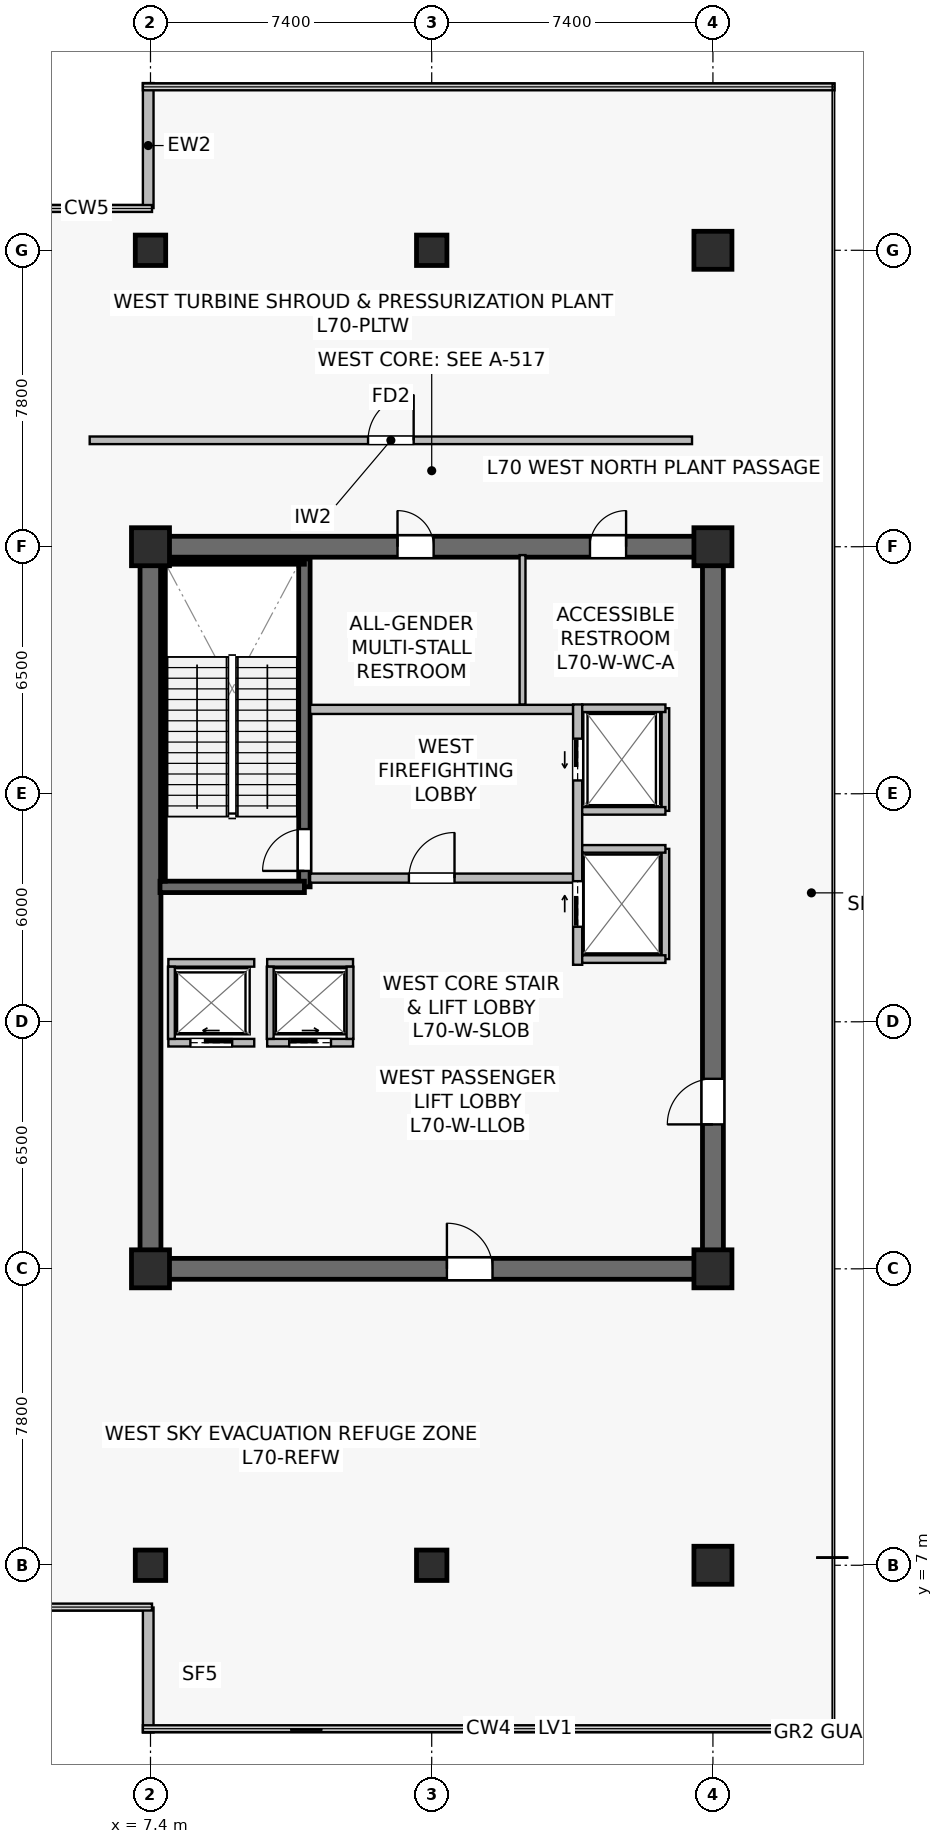
"""IFC4 building model, lengths in metres.
Left out: names, types, materials, properties, quantities, classifications, styles, units other than length and angle.
Written with IfcOpenShell. Run it as: python <this file> out.ifc"""

import sys

from ifc_helpers import new_model, si_unit, direction, frame, frame_2d, origin, origin_2d, place, context, subcontext, project, spatial, rectangle, extrude, source, transform, mapped, element, fill, save


model = new_model("IFC4")
c1 = context("Model", 3, precision=1e-05, world=origin(), true_north=direction((0.0, 1.0)))
c2 = subcontext(c1, "Body", "Model", "MODEL_VIEW")
j1 = project(units=[si_unit("LENGTHUNIT", "METRE"), si_unit("PLANEANGLEUNIT", "RADIAN")], contexts=[c1])
p1 = place(None, origin())
s1 = spatial("IfcSite", under=j1, at=p1, CompositionType="ELEMENT")
p2 = place(p1, origin())
s2 = spatial("IfcBuilding", under=s1, at=p2, CompositionType="ELEMENT")
p3 = place(p2, frame((0.0, 0.0, 291.6)))
s3 = spatial("IfcBuildingStorey", under=s2, at=p3, CompositionType="ELEMENT", Elevation=291.6)
p4 = place(p3, frame((7.125, 14.8, 0.0), z_axis=(0.0, 0.0, 1.0), x_axis=(1.0, 0.0, 0.0)))
e1 = element("IfcWall", 1, at=p4, inside=s3, PredefinedType="SHEAR", context=c2, shape_type="SweptSolid", body=[
    extrude(rectangle(XDim=15.35, YDim=0.55, at=frame_2d((7.675, 0.0))), origin(), (0.0, 0.0, 1.0), 5.7),
])
p5 = place(p4, frame((8.075, 0.0, 0.0)))
e2 = element("IfcOpeningElement", 2, at=p5, cuts=e1, PredefinedType="OPENING", context=c2, shape_type="SweptSolid", body=[
    extrude(rectangle(XDim=1.2, YDim=2.16, at=frame_2d((0.6, 1.08))), frame((0.0, 0.285, 0.0), z_axis=(0.0, -1.0, 0.0), x_axis=(1.0, 0.0, 0.0)), (0.0, 0.0, 1.0), 0.57),
])
p6 = place(p3, frame((7.125, 33.8, 0.0), z_axis=(0.0, 0.0, 1.0), x_axis=(1.0, 0.0, 0.0)))
e3 = element("IfcWall", 3, at=p6, inside=s3, PredefinedType="SHEAR", context=c2, shape_type="SweptSolid", body=[
    extrude(rectangle(XDim=15.35, YDim=0.55, at=frame_2d((7.675, 0.0))), origin(), (0.0, 0.0, 1.0), 5.7),
])
p7 = place(p6, frame((6.775, 0.0, 0.0)))
e4 = element("IfcOpeningElement", 4, at=p7, cuts=e3, PredefinedType="OPENING", context=c2, shape_type="SweptSolid", body=[
    extrude(rectangle(XDim=0.95, YDim=2.15, at=frame_2d((0.475, 1.075))), frame((0.0, 0.285, 0.0), z_axis=(0.0, -1.0, 0.0), x_axis=(1.0, 0.0, 0.0)), (0.0, 0.0, 1.0), 0.57),
])
p8 = place(p6, frame((11.84, 0.0, 0.0)))
e5 = element("IfcOpeningElement", 5, at=p8, cuts=e3, PredefinedType="OPENING", context=c2, shape_type="SweptSolid", body=[
    extrude(rectangle(XDim=0.95, YDim=2.15, at=frame_2d((0.475, 1.075))), frame((0.0, 0.285, 0.0), z_axis=(0.0, -1.0, 0.0), x_axis=(1.0, 0.0, 0.0)), (0.0, 0.0, 1.0), 0.57),
])
p9 = place(p3, frame((7.4, 15.075, 0.0), z_axis=(0.0, 0.0, 1.0), x_axis=(0.0, 1.0, 0.0)))
e6 = element("IfcWall", 6, at=p9, inside=s3, PredefinedType="SHEAR", context=c2, shape_type="SweptSolid", body=[
    extrude(rectangle(XDim=18.45, YDim=0.55, at=frame_2d((9.225, 0.0))), origin(), (0.0, 0.0, 1.0), 5.7),
])
p10 = place(p3, frame((22.2, 15.075, 0.0), z_axis=(0.0, 0.0, 1.0), x_axis=(0.0, 1.0, 0.0)))
e7 = element("IfcWall", 7, at=p10, inside=s3, PredefinedType="SHEAR", context=c2, shape_type="SweptSolid", body=[
    extrude(rectangle(XDim=18.45, YDim=0.55, at=frame_2d((9.225, 0.0))), origin(), (0.0, 0.0, 1.0), 5.7),
])
p11 = place(p10, frame((3.525, 0.0, 0.0)))
e8 = element("IfcOpeningElement", 8, at=p11, cuts=e7, PredefinedType="OPENING", context=c2, shape_type="SweptSolid", body=[
    extrude(rectangle(XDim=1.2, YDim=2.16, at=frame_2d((0.6, 1.08))), frame((0.0, 0.285, 0.0), z_axis=(0.0, -1.0, 0.0), x_axis=(1.0, 0.0, 0.0)), (0.0, 0.0, 1.0), 0.57),
])
p12 = place(p3, frame((11.45, 24.85, 0.0), z_axis=(0.0, 0.0, 1.0), x_axis=(0.0, 1.0, 0.0)))
e9 = element("IfcWall", 9, at=p12, inside=s3, PredefinedType="SHEAR", context=c2, shape_type="SweptSolid", body=[
    extrude(rectangle(XDim=8.63, YDim=0.3, at=frame_2d((4.315, 0.0))), origin(), (0.0, 0.0, 1.0), 5.7),
])
p13 = place(p12, frame((0.42, 0.0, 0.0)))
e10 = element("IfcOpeningElement", 10, at=p13, cuts=e9, PredefinedType="OPENING", context=c2, shape_type="SweptSolid", body=[
    extrude(rectangle(XDim=1.1, YDim=2.15, at=frame_2d((0.55, 1.075))), frame((0.0, 0.16, 0.0), z_axis=(0.0, -1.0, 0.0), x_axis=(1.0, 0.0, 0.0)), (0.0, 0.0, 1.0), 0.32),
])
p14 = place(p3, frame((7.65, 24.85, 0.0), z_axis=(0.0, 0.0, 1.0), x_axis=(1.0, 0.0, 0.0)))
e11 = element("IfcWall", 11, at=p14, inside=s3, PredefinedType="SHEAR", context=c2, shape_type="SweptSolid", body=[
    extrude(rectangle(XDim=3.8, YDim=0.3, at=frame_2d((1.9, 0.0))), origin(), (0.0, 0.0, 1.0), 5.7),
])
p15 = place(p3, frame((7.73, 33.4, 0.0), z_axis=(0.0, 0.0, 1.0), x_axis=(1.0, 0.0, 0.0)))
e12 = element("IfcWall", 12, at=p15, inside=s3, PredefinedType="SOLIDWALL", context=c2, shape_type="SweptSolid", body=[
    extrude(rectangle(XDim=3.72, YDim=0.12, at=frame_2d((1.86, 0.0))), origin(), (0.0, 0.0, 1.0), 5.7),
])
p16 = place(p3, frame((7.73, 25.0, 0.0), z_axis=(0.0, 0.0, 1.0), x_axis=(0.0, 1.0, 0.0)))
e13 = element("IfcWall", 13, at=p16, inside=s3, PredefinedType="SOLIDWALL", context=c2, shape_type="SweptSolid", body=[
    extrude(rectangle(XDim=8.32, YDim=0.12, at=frame_2d((4.16, 0.0))), origin(), (0.0, 0.0, 1.0), 5.7),
])
m1 = source(origin(), c2, "Body", "SweptSolid", [
    extrude(rectangle(XDim=0.8, YDim=0.8, at=origin_2d()), origin(), (0.0, 0.0, 1.0), 6.0),
])
p17 = place(p3, frame((14.8, 7.0, 0.0), z_axis=(0.0, 0.0, 1.0), x_axis=(1.0, 0.0, 0.0)))
e14 = element("IfcColumn", 14, at=p17, inside=s3, PredefinedType="COLUMN", context=c2, shape_type="MappedRepresentation", body=[
    mapped(m1, transform((0.0, 0.0, 0.0), scale=1.0)),
])
m2 = source(origin(), c2, "Body", "SweptSolid", [
    extrude(rectangle(XDim=1.0, YDim=1.0, at=origin_2d()), origin(), (0.0, 0.0, 1.0), 6.0),
])
for number, where, z_axis, x_axis in (
    (15, (22.2, 7.0, 0.0), (0.0, 0.0, 1.0), (1.0, 0.0, 0.0)),
    (16, (7.4, 14.8, 0.0), (0.0, 0.0, 1.0), (1.0, 0.0, 0.0)),
    (17, (22.2, 14.8, 0.0), (0.0, 0.0, 1.0), (1.0, 0.0, 0.0)),
    (18, (7.4, 33.8, 0.0), (0.0, 0.0, 1.0), (1.0, 0.0, 0.0)),
    (19, (22.2, 33.8, 0.0), (0.0, 0.0, 1.0), (1.0, 0.0, 0.0)),
):
    element("IfcColumn", number, at=place(p3, frame(where, z_axis=z_axis, x_axis=x_axis)), inside=s3, PredefinedType="COLUMN", context=c2, shape_type="MappedRepresentation", body=[
        mapped(m2, transform((0.0, 0.0, 0.0), scale=1.0)),
    ])
p18 = place(p3, frame((14.8, 41.6, 0.0), z_axis=(0.0, 0.0, 1.0), x_axis=(1.0, 0.0, 0.0)))
e20 = element("IfcColumn", 20, at=p18, inside=s3, PredefinedType="COLUMN", context=c2, shape_type="MappedRepresentation", body=[
    mapped(m1, transform((0.0, 0.0, 0.0), scale=1.0)),
])
p19 = place(p3, frame((22.2, 41.6, 0.0), z_axis=(0.0, 0.0, 1.0), x_axis=(1.0, 0.0, 0.0)))
e21 = element("IfcColumn", 21, at=p19, inside=s3, PredefinedType="COLUMN", context=c2, shape_type="MappedRepresentation", body=[
    mapped(m2, transform((0.0, 0.0, 0.0), scale=1.0)),
])
for number, where, z_axis, x_axis in (
    (22, (7.4, 7.0, 0.0), (0.0, 0.0, 1.0), (1.0, 0.0, 0.0)),
    (23, (7.4, 41.6, 0.0), (0.0, 0.0, 1.0), (1.0, 0.0, 0.0)),
):
    element("IfcColumn", number, at=place(p3, frame(where, z_axis=z_axis, x_axis=x_axis)), inside=s3, PredefinedType="COLUMN", context=c2, shape_type="MappedRepresentation", body=[
        mapped(m1, transform((0.0, 0.0, 0.0), scale=1.0)),
    ])
p20 = place(p3, frame((7.34, 46.0, 0.0), z_axis=(0.0, 0.0, 1.0), x_axis=(0.0, -1.0, 0.0)))
e24 = element("IfcWall", 24, at=p20, inside=s3, PredefinedType="STANDARD", context=c2, shape_type="SweptSolid", body=[
    extrude(rectangle(XDim=3.288, YDim=0.28, at=frame_2d((1.644, 0.0))), origin(), (0.0, 0.0, 1.0), 5.7),
])
p21 = place(p3, frame((7.34, 5.888, 0.0), z_axis=(0.0, 0.0, 1.0), x_axis=(0.0, -1.0, 0.0)))
e25 = element("IfcWall", 25, at=p21, inside=s3, PredefinedType="STANDARD", context=c2, shape_type="SweptSolid", body=[
    extrude(rectangle(XDim=3.288, YDim=0.28, at=frame_2d((1.644, 0.0))), origin(), (0.0, 0.0, 1.0), 5.7),
])
p22 = place(p3, frame((11.6, 25.08, 0.0), z_axis=(0.0, 0.0, 1.0), x_axis=(1.0, 0.0, 0.0)))
e26 = element("IfcWall", 26, at=p22, inside=s3, PredefinedType="SOLIDWALL", context=c2, shape_type="SweptSolid", body=[
    extrude(rectangle(XDim=6.92, YDim=0.24, at=frame_2d((3.46, 0.0))), origin(), (0.0, 0.0, 1.0), 5.097),
])
p23 = place(p22, frame((2.6, 0.0, 0.0)))
e27 = element("IfcOpeningElement", 27, at=p23, cuts=e26, PredefinedType="OPENING", context=c2, shape_type="SweptSolid", body=[
    extrude(rectangle(XDim=1.2, YDim=2.16, at=frame_2d((0.6, 1.08))), frame((0.0, 0.13, 0.0), z_axis=(0.0, -1.0, 0.0), x_axis=(1.0, 0.0, 0.0)), (0.0, 0.0, 1.0), 0.26),
])
p24 = place(p3, frame((11.6, 29.52, 0.0), z_axis=(0.0, 0.0, 1.0), x_axis=(1.0, 0.0, 0.0)))
e28 = element("IfcWall", 28, at=p24, inside=s3, PredefinedType="SOLIDWALL", context=c2, shape_type="SweptSolid", body=[
    extrude(rectangle(XDim=6.92, YDim=0.24, at=frame_2d((3.46, 0.0))), origin(), (0.0, 0.0, 1.0), 5.097),
])
p25 = place(p3, frame((18.64, 22.8, 0.0), z_axis=(0.0, 0.0, 1.0), x_axis=(0.0, 1.0, 0.0)))
e29 = element("IfcWall", 29, at=p25, inside=s3, PredefinedType="SOLIDWALL", context=c2, shape_type="SweptSolid", body=[
    extrude(rectangle(XDim=6.85, YDim=0.24, at=frame_2d((3.425, 0.0))), origin(), (0.0, 0.0, 1.0), 4.835),
])
p26 = place(p25, frame((4.85, 0.0, 0.0)))
e30 = element("IfcOpeningElement", 30, at=p26, cuts=e29, PredefinedType="OPENING", context=c2, shape_type="SweptSolid", body=[
    extrude(rectangle(XDim=1.1, YDim=2.22, at=frame_2d((0.55, 1.11))), frame((0.0, 0.13, 0.0), z_axis=(0.0, -1.0, 0.0), x_axis=(1.0, 0.0, 0.0)), (0.0, 0.0, 1.0), 0.26),
])
p27 = place(p25, frame((1.0, 0.0, 0.0)))
e31 = element("IfcOpeningElement", 31, at=p27, cuts=e29, PredefinedType="OPENING", context=c2, shape_type="SweptSolid", body=[
    extrude(rectangle(XDim=1.2, YDim=2.22, at=frame_2d((0.6, 1.11))), frame((0.0, 0.13, 0.0), z_axis=(0.0, -1.0, 0.0), x_axis=(1.0, 0.0, 0.0)), (0.0, 0.0, 1.0), 0.26),
])
p28 = place(p3, frame((7.87, 20.75, 0.0), z_axis=(0.0, 0.0, 1.0), x_axis=(1.0, 0.0, 0.0)))
e32 = element("IfcWall", 32, at=p28, inside=s3, PredefinedType="SOLIDWALL", context=c2, shape_type="SweptSolid", body=[
    extrude(rectangle(XDim=2.26, YDim=0.2, at=frame_2d((1.13, 0.0))), origin(), (0.0, 0.0, 1.0), 5.7),
])
p29 = place(p28, frame((0.58, 0.0, 0.0)))
e33 = element("IfcOpeningElement", 33, at=p29, cuts=e32, PredefinedType="OPENING", context=c2, shape_type="SweptSolid", body=[
    extrude(rectangle(XDim=1.1, YDim=2.22, at=frame_2d((0.55, 1.11))), frame((0.0, 0.11, 0.0), z_axis=(0.0, -1.0, 0.0), x_axis=(1.0, 0.0, 0.0)), (0.0, 0.0, 1.0), 0.22),
])
p30 = place(p3, frame((7.87, 22.85, 0.0), z_axis=(0.0, 0.0, 1.0), x_axis=(1.0, 0.0, 0.0)))
e34 = element("IfcWall", 34, at=p30, inside=s3, PredefinedType="SOLIDWALL", context=c2, shape_type="SweptSolid", body=[
    extrude(rectangle(XDim=2.26, YDim=0.2, at=frame_2d((1.13, 0.0))), origin(), (0.0, 0.0, 1.0), 5.7),
])
p31 = place(p3, frame((7.95, 20.85, 0.0), z_axis=(0.0, 0.0, 1.0), x_axis=(0.0, 1.0, 0.0)))
e35 = element("IfcWall", 35, at=p31, inside=s3, PredefinedType="SOLIDWALL", context=c2, shape_type="SweptSolid", body=[
    extrude(rectangle(XDim=1.9, YDim=0.18, at=frame_2d((0.95, 0.0))), origin(), (0.0, 0.0, 1.0), 5.7),
])
p32 = place(p3, frame((10.47, 20.75, 0.0), z_axis=(0.0, 0.0, 1.0), x_axis=(1.0, 0.0, 0.0)))
e36 = element("IfcWall", 36, at=p32, inside=s3, PredefinedType="SOLIDWALL", context=c2, shape_type="SweptSolid", body=[
    extrude(rectangle(XDim=2.26, YDim=0.2, at=frame_2d((1.13, 0.0))), origin(), (0.0, 0.0, 1.0), 5.7),
])
p33 = place(p32, frame((0.58, 0.0, 0.0)))
e37 = element("IfcOpeningElement", 37, at=p33, cuts=e36, PredefinedType="OPENING", context=c2, shape_type="SweptSolid", body=[
    extrude(rectangle(XDim=1.1, YDim=2.22, at=frame_2d((0.55, 1.11))), frame((0.0, 0.11, 0.0), z_axis=(0.0, -1.0, 0.0), x_axis=(1.0, 0.0, 0.0)), (0.0, 0.0, 1.0), 0.22),
])
p34 = place(p3, frame((10.47, 22.85, 0.0), z_axis=(0.0, 0.0, 1.0), x_axis=(1.0, 0.0, 0.0)))
e38 = element("IfcWall", 38, at=p34, inside=s3, PredefinedType="SOLIDWALL", context=c2, shape_type="SweptSolid", body=[
    extrude(rectangle(XDim=2.26, YDim=0.2, at=frame_2d((1.13, 0.0))), origin(), (0.0, 0.0, 1.0), 5.7),
])
for number, where, z_axis, x_axis in (
    (39, (10.55, 20.85, 0.0), (0.0, 0.0, 1.0), (0.0, 1.0, 0.0)),
    (40, (12.65, 20.85, 0.0), (0.0, 0.0, 1.0), (0.0, 1.0, 0.0)),
):
    element("IfcWall", number, at=place(p3, frame(where, z_axis=z_axis, x_axis=x_axis)), inside=s3, PredefinedType="SOLIDWALL", context=c2, shape_type="SweptSolid", body=[
        extrude(rectangle(XDim=1.9, YDim=0.18, at=frame_2d((0.95, 0.0))), origin(), (0.0, 0.0, 1.0), 5.7),
    ])
p35 = place(p3, frame((20.95, 26.85, 0.0), z_axis=(0.0, 0.0, 1.0), x_axis=(0.0, 1.0, 0.0)))
e41 = element("IfcWall", 41, at=p35, inside=s3, PredefinedType="SOLIDWALL", context=c2, shape_type="SweptSolid", body=[
    extrude(rectangle(XDim=2.7, YDim=0.2, at=frame_2d((1.35, 0.0))), origin(), (0.0, 0.0, 1.0), 5.7),
])
p36 = place(p3, frame((18.76, 29.55, 0.0), z_axis=(0.0, 0.0, 1.0), x_axis=(1.0, 0.0, 0.0)))
e42 = element("IfcWall", 42, at=p36, inside=s3, PredefinedType="SOLIDWALL", context=c2, shape_type="SweptSolid", body=[
    extrude(rectangle(XDim=2.19, YDim=0.2, at=frame_2d((1.095, 0.0))), origin(), (0.0, 0.0, 1.0), 5.7),
])
p37 = place(p3, frame((18.76, 26.85, 0.0), z_axis=(0.0, 0.0, 1.0), x_axis=(1.0, 0.0, 0.0)))
e43 = element("IfcWall", 43, at=p37, inside=s3, PredefinedType="SOLIDWALL", context=c2, shape_type="SweptSolid", body=[
    extrude(rectangle(XDim=2.19, YDim=0.2, at=frame_2d((1.095, 0.0))), origin(), (0.0, 0.0, 1.0), 5.097),
])
p38 = place(p3, frame((20.95, 22.95, 0.0), z_axis=(0.0, 0.0, 1.0), x_axis=(0.0, 1.0, 0.0)))
e44 = element("IfcWall", 44, at=p38, inside=s3, PredefinedType="SOLIDWALL", context=c2, shape_type="SweptSolid", body=[
    extrude(rectangle(XDim=2.9, YDim=0.2, at=frame_2d((1.45, 0.0))), origin(), (0.0, 0.0, 1.0), 4.835),
])
for number, where, z_axis, x_axis in (
    (45, (18.76, 25.85, 0.0), (0.0, 0.0, 1.0), (1.0, 0.0, 0.0)),
    (46, (18.76, 22.95, 0.0), (0.0, 0.0, 1.0), (1.0, 0.0, 0.0)),
):
    element("IfcWall", number, at=place(p3, frame(where, z_axis=z_axis, x_axis=x_axis)), inside=s3, PredefinedType="SOLIDWALL", context=c2, shape_type="SweptSolid", body=[
        extrude(rectangle(XDim=2.19, YDim=0.2, at=frame_2d((1.095, 0.0))), origin(), (0.0, 0.0, 1.0), 5.7),
    ])
p39 = place(p3, frame((17.19, 29.65, 0.0), z_axis=(0.0, 0.0, 1.0), x_axis=(0.0, 1.0, 0.0)))
e47 = element("IfcWall", 47, at=p39, inside=s3, PredefinedType="PLUMBINGWALL", context=c2, shape_type="SweptSolid", body=[
    extrude(rectangle(XDim=3.93, YDim=0.155, at=frame_2d((1.965, 0.0))), origin(), (0.0, 0.0, 1.0), 5.7),
])
p40 = place(p3, frame((5.8, 36.6, 0.0), z_axis=(0.0, 0.0, 1.0), x_axis=(1.0, 0.0, 0.0)))
e48 = element("IfcWall", 48, at=p40, inside=s3, PredefinedType="SOLIDWALL", context=c2, shape_type="SweptSolid", body=[
    extrude(rectangle(XDim=15.85, YDim=0.2, at=frame_2d((7.925, 0.0))), origin(), (0.0, 0.0, 1.0), 5.097),
])
p41 = place(p40, frame((7.325, 0.0, 0.0)))
e49 = element("IfcOpeningElement", 49, at=p41, cuts=e48, PredefinedType="OPENING", context=c2, shape_type="SweptSolid", body=[
    extrude(rectangle(XDim=1.2, YDim=2.16, at=frame_2d((0.6, 1.08))), frame((0.0, 0.11, 0.0), z_axis=(0.0, -1.0, 0.0), x_axis=(1.0, 0.0, 0.0)), (0.0, 0.0, 1.0), 0.22),
])
m3 = source(origin(), c2, "Body", "SweptSolid", [
    extrude(rectangle(XDim=1.1, YDim=2.15, at=frame_2d((0.55, 1.075))), frame((0.0, 0.025, 0.0), z_axis=(0.0, -1.0, 0.0), x_axis=(1.0, 0.0, 0.0)), (0.0, 0.0, 1.0), 0.05),
])
p42 = place(p13, origin())
e50 = element("IfcDoor", 50, at=p42, inside=s3, OperationType="SINGLE_SWING_LEFT", PredefinedType="DOOR", context=c2, shape_type="MappedRepresentation", body=[
    mapped(m3, transform((0.0, 0.0, 0.0), scale=1.0)),
])
fill(e10, e50)
m4 = source(origin(), c2, "Body", "SweptSolid", [
    extrude(rectangle(XDim=1.2, YDim=2.16, at=frame_2d((0.6, 1.08))), frame((0.0, 0.025, 0.0), z_axis=(0.0, -1.0, 0.0), x_axis=(1.0, 0.0, 0.0)), (0.0, 0.0, 1.0), 0.05),
])
p43 = place(p23, origin())
e51 = element("IfcDoor", 51, at=p43, inside=s3, OperationType="SINGLE_SWING_RIGHT", PredefinedType="DOOR", context=c2, shape_type="MappedRepresentation", body=[
    mapped(m4, transform((0.0, 0.0, 0.0), scale=1.0)),
])
fill(e27, e51)
m5 = source(origin(), c2, "Body", "SweptSolid", [
    extrude(rectangle(XDim=1.1, YDim=2.22, at=frame_2d((0.55, 1.11))), frame((0.0, 0.025, 0.0), z_axis=(0.0, -1.0, 0.0), x_axis=(1.0, 0.0, 0.0)), (0.0, 0.0, 1.0), 0.05),
])
p44 = place(p29, origin())
e52 = element("IfcDoor", 52, at=p44, inside=s3, OperationType="SLIDING_TO_LEFT", PredefinedType="USERDEFINED", context=c2, shape_type="MappedRepresentation", body=[
    mapped(m5, transform((0.0, 0.0, 0.0), scale=1.0)),
])
fill(e33, e52)
p45 = place(p33, origin())
e53 = element("IfcDoor", 53, at=p45, inside=s3, OperationType="SLIDING_TO_RIGHT", PredefinedType="USERDEFINED", context=c2, shape_type="MappedRepresentation", body=[
    mapped(m5, transform((0.0, 0.0, 0.0), scale=1.0)),
])
fill(e37, e53)
p46 = place(p26, origin())
e54 = element("IfcDoor", 54, at=p46, inside=s3, OperationType="SLIDING_TO_LEFT", PredefinedType="USERDEFINED", context=c2, shape_type="MappedRepresentation", body=[
    mapped(m5, transform((0.0, 0.0, 0.0), scale=1.0)),
])
fill(e30, e54)
m6 = source(origin(), c2, "Body", "SweptSolid", [
    extrude(rectangle(XDim=1.2, YDim=2.22, at=frame_2d((0.6, 1.11))), frame((0.0, 0.025, 0.0), z_axis=(0.0, -1.0, 0.0), x_axis=(1.0, 0.0, 0.0)), (0.0, 0.0, 1.0), 0.05),
])
p47 = place(p27, origin())
e55 = element("IfcDoor", 55, at=p47, inside=s3, OperationType="SLIDING_TO_RIGHT", PredefinedType="USERDEFINED", context=c2, shape_type="MappedRepresentation", body=[
    mapped(m6, transform((0.0, 0.0, 0.0), scale=1.0)),
])
fill(e31, e55)
p48 = place(p5, origin())
e56 = element("IfcDoor", 56, at=p48, inside=s3, OperationType="SINGLE_SWING_LEFT", PredefinedType="DOOR", context=c2, shape_type="MappedRepresentation", body=[
    mapped(m4, transform((0.0, 0.0, 0.0), scale=1.0)),
])
fill(e2, e56)
p49 = place(p11, origin())
e57 = element("IfcDoor", 57, at=p49, inside=s3, OperationType="SINGLE_SWING_LEFT", PredefinedType="DOOR", context=c2, shape_type="MappedRepresentation", body=[
    mapped(m4, transform((0.0, 0.0, 0.0), scale=1.0)),
])
fill(e8, e57)
m7 = source(origin(), c2, "Body", "SweptSolid", [
    extrude(rectangle(XDim=0.95, YDim=2.15, at=frame_2d((0.475, 1.075))), frame((0.0, 0.025, 0.0), z_axis=(0.0, -1.0, 0.0), x_axis=(1.0, 0.0, 0.0)), (0.0, 0.0, 1.0), 0.05),
])
p50 = place(p7, origin())
e58 = element("IfcDoor", 58, at=p50, inside=s3, OperationType="SINGLE_SWING_LEFT", PredefinedType="DOOR", context=c2, shape_type="MappedRepresentation", body=[
    mapped(m7, transform((0.0, 0.0, 0.0), scale=1.0)),
])
fill(e4, e58)
p51 = place(p8, origin())
e59 = element("IfcDoor", 59, at=p51, inside=s3, OperationType="SINGLE_SWING_RIGHT", PredefinedType="DOOR", context=c2, shape_type="MappedRepresentation", body=[
    mapped(m7, transform((0.0, 0.0, 0.0), scale=1.0)),
])
fill(e5, e59)
p52 = place(p41, origin())
e60 = element("IfcDoor", 60, at=p52, inside=s3, OperationType="SINGLE_SWING_RIGHT", PredefinedType="DOOR", context=c2, shape_type="MappedRepresentation", body=[
    mapped(m4, transform((0.0, 0.0, 0.0), scale=1.0)),
])
fill(e49, e60)
save(model, sys.argv[1])
